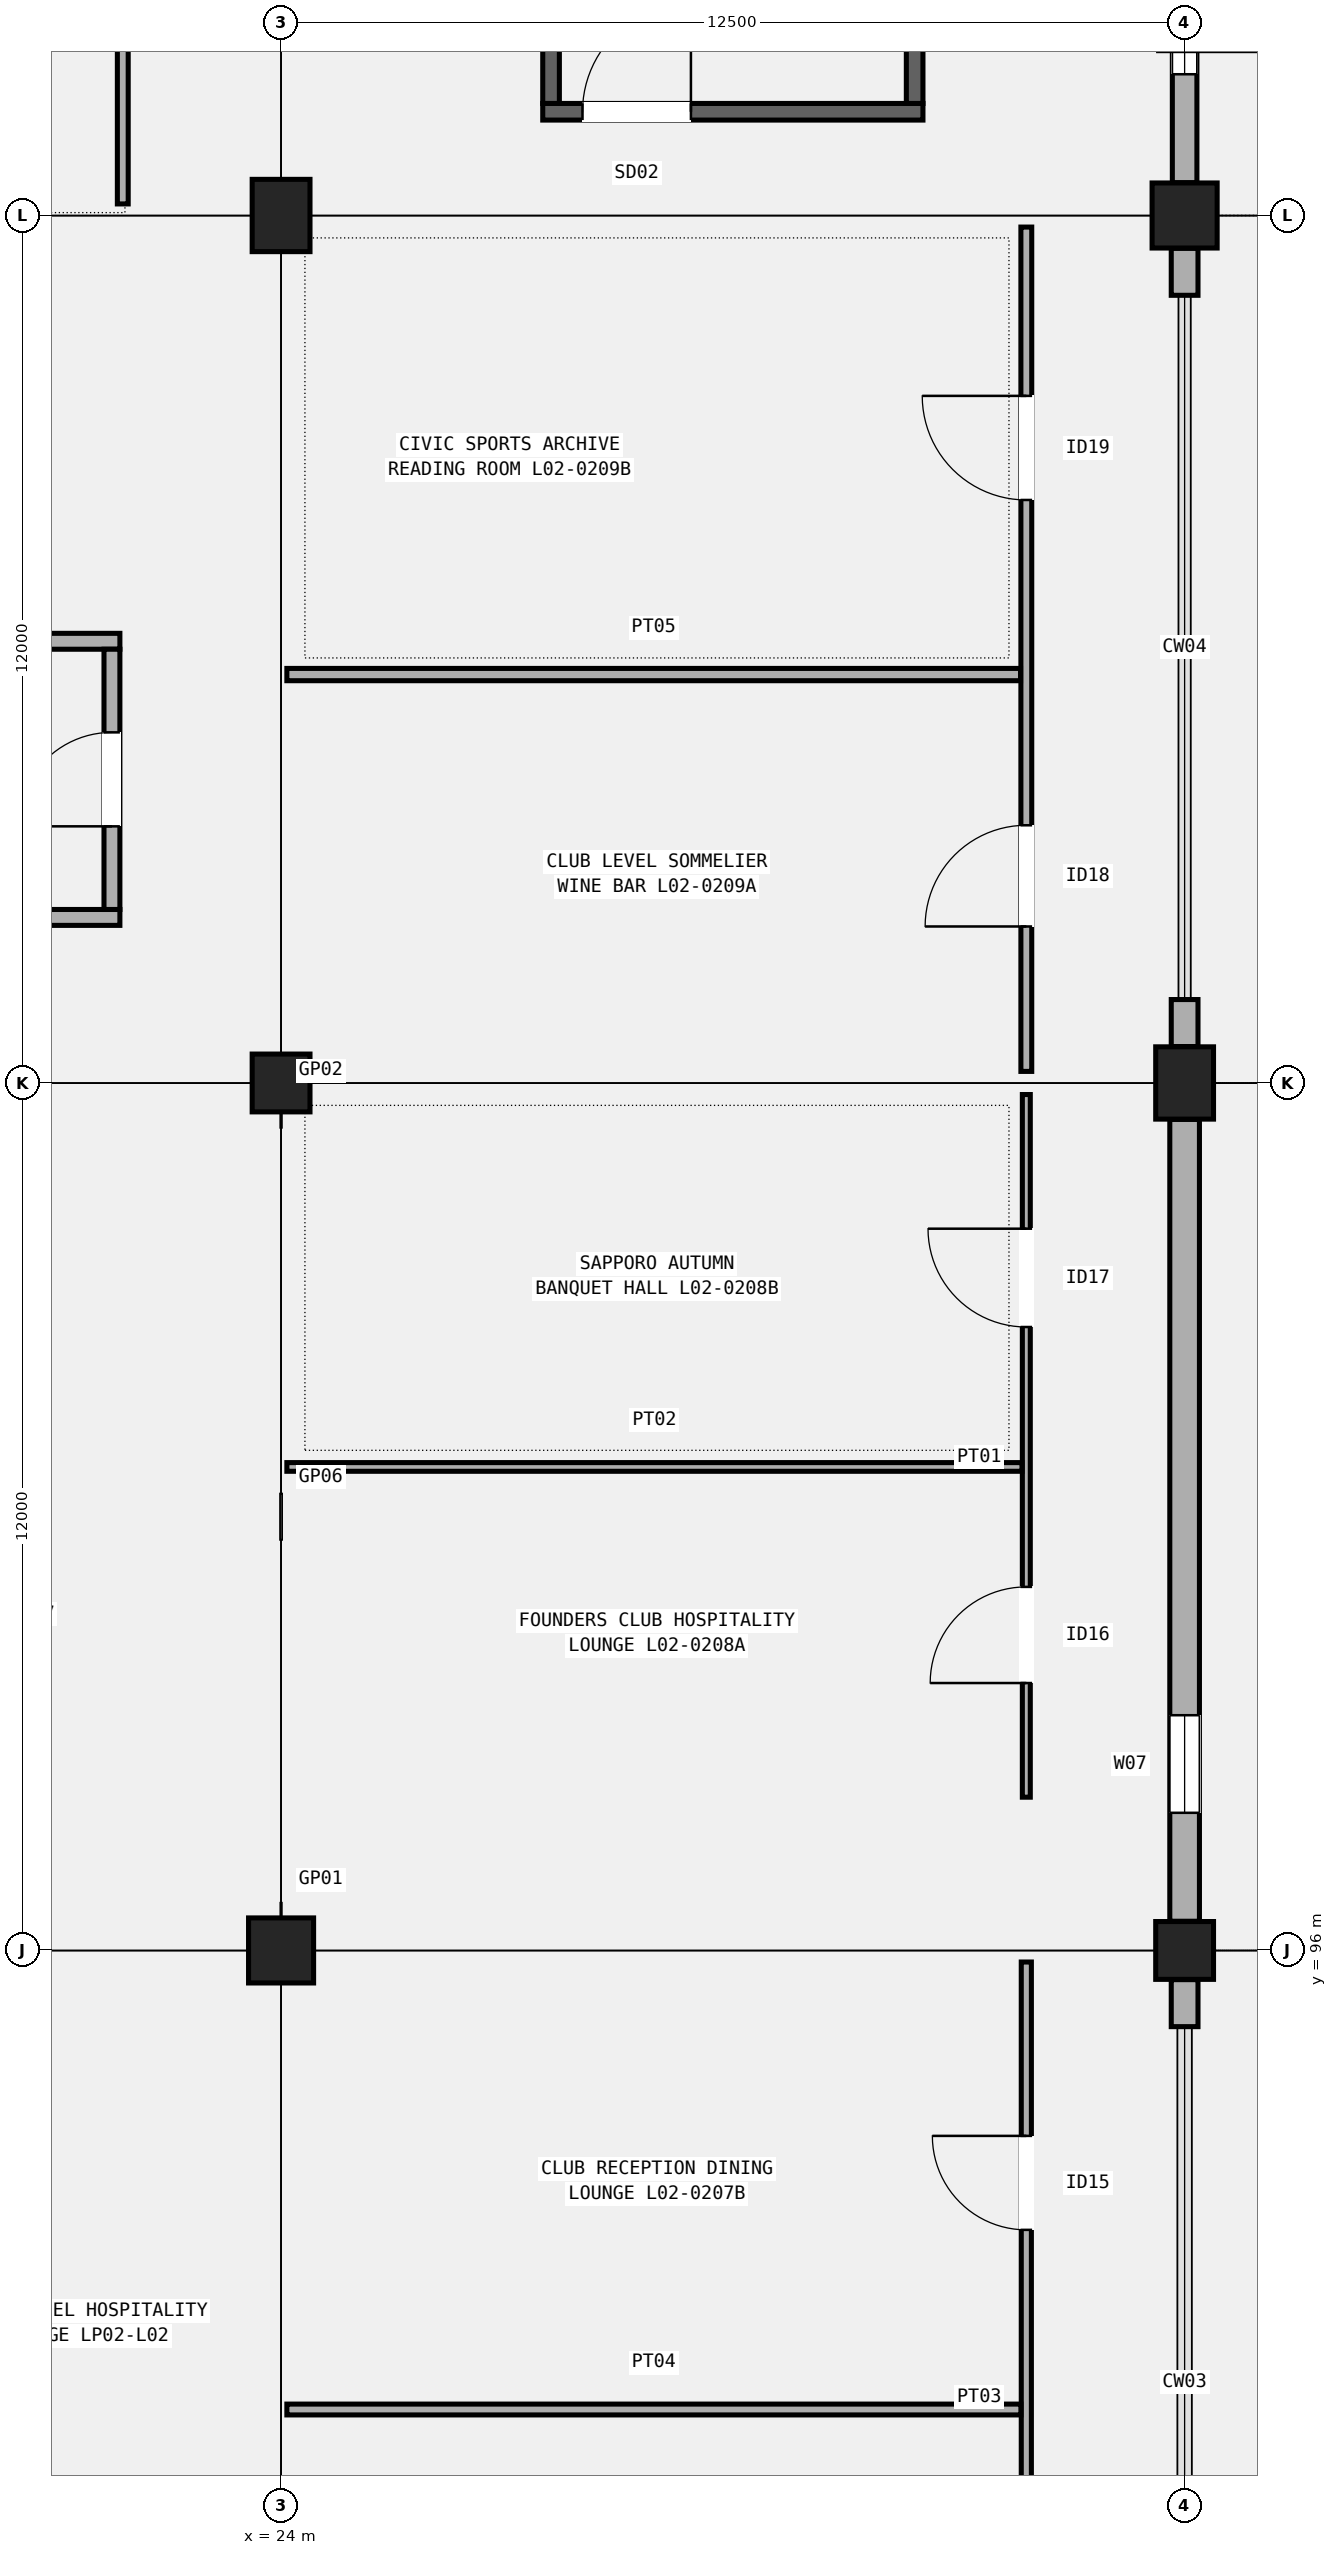
"""IFC4 building model, lengths in metres.
Left out: names, types, materials, properties, quantities, classifications, styles, units other than length and angle.
Written with IfcOpenShell. Run it as: python <this file> out.ifc"""

import sys

from ifc_helpers import new_model, si_unit, direction, frame, frame_2d, origin, origin_2d, place, context, subcontext, project, spatial, rectangle, extrude, element, fill, save


model = new_model("IFC4")
c1 = context("Model", 3, precision=1e-05, world=origin(), true_north=direction((0.0, 1.0)))
c2 = subcontext(c1, "Body", "Model", "MODEL_VIEW")
j1 = project(units=[si_unit("LENGTHUNIT", "METRE"), si_unit("PLANEANGLEUNIT", "RADIAN")], contexts=[c1])
p1 = place(None, origin())
s1 = spatial("IfcSite", under=j1, at=p1, CompositionType="ELEMENT")
p2 = place(p1, origin())
s2 = spatial("IfcBuilding", under=s1, at=p2, CompositionType="ELEMENT")
p3 = place(p2, frame((0.0, 0.0, 10.2)))
s3 = spatial("IfcBuildingStorey", under=s2, at=p3, CompositionType="ELEMENT", Elevation=10.2)
p4 = place(p3, frame((24.0, 96.0, 0.0), z_axis=(0.0, 0.0, 1.0), x_axis=(1.0, 0.0, 0.0)))
e1 = element("IfcColumn", 1, at=p4, inside=s3, PredefinedType="COLUMN", context=c2, shape_type="SweptSolid", body=[
    extrude(rectangle(XDim=0.9, YDim=0.9, at=origin_2d()), origin(), (0.0, 0.0, 1.0), 5.1),
])
p5 = place(p3, frame((24.0, 108.0, 0.0), z_axis=(0.0, 0.0, 1.0), x_axis=(1.0, 0.0, 0.0)))
e2 = element("IfcColumn", 2, at=p5, inside=s3, PredefinedType="COLUMN", context=c2, shape_type="SweptSolid", body=[
    extrude(rectangle(XDim=0.8, YDim=0.8, at=origin_2d()), origin(), (0.0, 0.0, 1.0), 5.1),
])
p6 = place(p3, frame((24.0, 120.0, 0.0), z_axis=(0.0, 0.0, 1.0), x_axis=(1.0, 0.0, 0.0)))
e3 = element("IfcColumn", 3, at=p6, inside=s3, PredefinedType="COLUMN", context=c2, shape_type="SweptSolid", body=[
    extrude(rectangle(XDim=0.8, YDim=1.0, at=origin_2d()), origin(), (0.0, 0.0, 1.0), 5.1),
])
p7 = place(p3, frame((36.5, 96.0, 0.0), z_axis=(0.0, 0.0, 1.0), x_axis=(1.0, 0.0, 0.0)))
e4 = element("IfcColumn", 4, at=p7, inside=s3, PredefinedType="COLUMN", context=c2, shape_type="SweptSolid", body=[
    extrude(rectangle(XDim=0.8, YDim=0.8, at=origin_2d()), origin(), (0.0, 0.0, 1.0), 5.1),
])
p8 = place(p3, frame((36.5, 108.0, 0.0), z_axis=(0.0, 0.0, 1.0), x_axis=(1.0, 0.0, 0.0)))
e5 = element("IfcColumn", 5, at=p8, inside=s3, PredefinedType="COLUMN", context=c2, shape_type="SweptSolid", body=[
    extrude(rectangle(XDim=0.8, YDim=1.0, at=origin_2d()), origin(), (0.0, 0.0, 1.0), 5.1),
])
p9 = place(p3, frame((36.5, 120.0, 0.0), z_axis=(0.0, 0.0, 1.0), x_axis=(1.0, 0.0, 0.0)))
e6 = element("IfcColumn", 6, at=p9, inside=s3, PredefinedType="COLUMN", context=c2, shape_type="SweptSolid", body=[
    extrude(rectangle(XDim=0.9, YDim=0.9, at=origin_2d()), origin(), (0.0, 0.0, 1.0), 5.1),
])
p10 = place(p3, frame((36.5, 94.946, 0.0), z_axis=(0.0, 0.0, 1.0), x_axis=(0.0, 1.0, 0.0)))
e7 = element("IfcWall", 7, at=p10, inside=s3, PredefinedType="SOLIDWALL", context=c2, shape_type="SweptSolid", body=[
    extrude(rectangle(XDim=0.65, YDim=0.37, at=frame_2d((0.325, 0.0))), origin(), (0.0, 0.0, 1.0), 4.12),
])
p11 = place(p3, frame((36.5, 96.404, 0.0), z_axis=(0.0, 0.0, 1.0), x_axis=(0.0, 1.0, 0.0)))
e8 = element("IfcWall", 8, at=p11, inside=s3, PredefinedType="SOLIDWALL", context=c2, shape_type="SweptSolid", body=[
    extrude(rectangle(XDim=11.092, YDim=0.41, at=frame_2d((5.546, 0.0))), origin(), (0.0, 0.0, 1.0), 4.232),
])
p12 = place(p11, frame((1.5, 0.0, 0.95)))
e9 = element("IfcOpeningElement", 9, at=p12, cuts=e8, PredefinedType="OPENING", context=c2, shape_type="SweptSolid", body=[
    extrude(rectangle(XDim=1.35, YDim=2.0, at=frame_2d((0.675, 1.0))), frame((0.0, 0.215, 0.0), z_axis=(0.0, -1.0, 0.0), x_axis=(1.0, 0.0, 0.0)), (0.0, 0.0, 1.0), 0.43),
])
p13 = place(p3, frame((36.5, 108.504, 0.0), z_axis=(0.0, 0.0, 1.0), x_axis=(0.0, 1.0, 0.0)))
e10 = element("IfcWall", 10, at=p13, inside=s3, PredefinedType="SOLIDWALL", context=c2, shape_type="SweptSolid", body=[
    extrude(rectangle(XDim=0.65, YDim=0.37, at=frame_2d((0.325, 0.0))), origin(), (0.0, 0.0, 1.0), 4.02),
])
p14 = place(p3, frame((36.5, 118.896, 0.0), z_axis=(0.0, 0.0, 1.0), x_axis=(0.0, 1.0, 0.0)))
e11 = element("IfcWall", 11, at=p14, inside=s3, PredefinedType="SOLIDWALL", context=c2, shape_type="SweptSolid", body=[
    extrude(rectangle(XDim=0.65, YDim=0.37, at=frame_2d((0.325, 0.0))), origin(), (0.0, 0.0, 1.0), 4.02),
])
p15 = place(p3, frame((36.5, 120.454, 0.0), z_axis=(0.0, 0.0, 1.0), x_axis=(0.0, 1.0, 0.0)))
e12 = element("IfcWall", 12, at=p15, inside=s3, PredefinedType="SOLIDWALL", context=c2, shape_type="SweptSolid", body=[
    extrude(rectangle(XDim=11.142, YDim=0.34, at=frame_2d((5.571, 0.0))), origin(), (0.0, 0.0, 1.0), 4.12),
])
p16 = place(p15, frame((1.5, 0.0, 0.95)))
e13 = element("IfcOpeningElement", 13, at=p16, cuts=e12, PredefinedType="OPENING", context=c2, shape_type="SweptSolid", body=[
    extrude(rectangle(XDim=1.35, YDim=2.4, at=frame_2d((0.675, 1.2))), frame((0.0, 0.18, 0.0), z_axis=(0.0, -1.0, 0.0), x_axis=(1.0, 0.0, 0.0)), (0.0, 0.0, 1.0), 0.36),
])
p17 = place(p3, frame((27.62, 121.435, 0.0), z_axis=(0.0, 0.0, 1.0), x_axis=(1.0, 0.0, 0.0)))
e14 = element("IfcWall", 14, at=p17, inside=s3, PredefinedType="SHEAR", context=c2, shape_type="SweptSolid", body=[
    extrude(rectangle(XDim=5.26, YDim=0.23, at=frame_2d((2.63, 0.0))), origin(), (0.0, 0.0, 1.0), 4.82),
])
p18 = place(p17, frame((0.55, 0.0, 0.0)))
e15 = element("IfcOpeningElement", 15, at=p18, cuts=e14, PredefinedType="OPENING", context=c2, shape_type="SweptSolid", body=[
    extrude(rectangle(XDim=1.5, YDim=2.2, at=frame_2d((0.75, 1.1))), frame((0.0, 0.125, 0.0), z_axis=(0.0, -1.0, 0.0), x_axis=(1.0, 0.0, 0.0)), (0.0, 0.0, 1.0), 0.25),
])
for number, where, z_axis, x_axis in (
    (16, (27.735, 121.55, 0.0), (0.0, 0.0, 1.0), (0.0, 1.0, 0.0)),
    (17, (32.765, 121.55, 0.0), (0.0, 0.0, 1.0), (0.0, 1.0, 0.0)),
):
    element("IfcWall", number, at=place(p3, frame(where, z_axis=z_axis, x_axis=x_axis)), inside=s3, PredefinedType="SHEAR", context=c2, shape_type="SweptSolid", body=[
        extrude(rectangle(XDim=8.9, YDim=0.23, at=frame_2d((4.45, 0.0))), origin(), (0.0, 0.0, 1.0), 4.82),
    ])
for number, where, z_axis, x_axis in (
    (18, (17.48, 110.29, 0.0), (0.0, 0.0, 1.0), (1.0, 0.0, 0.0)),
    (19, (17.48, 114.11, 0.0), (0.0, 0.0, 1.0), (1.0, 0.0, 0.0)),
):
    element("IfcWall", number, at=place(p3, frame(where, z_axis=z_axis, x_axis=x_axis)), inside=s3, PredefinedType="SOLIDWALL", context=c2, shape_type="SweptSolid", body=[
        extrude(rectangle(XDim=4.29, YDim=0.22, at=frame_2d((2.145, 0.0))), origin(), (0.0, 0.0, 1.0), 4.22),
    ])
p19 = place(p3, frame((21.66, 110.4, 0.0), z_axis=(0.0, 0.0, 1.0), x_axis=(0.0, 1.0, 0.0)))
e20 = element("IfcWall", 20, at=p19, inside=s3, PredefinedType="SOLIDWALL", context=c2, shape_type="SweptSolid", body=[
    extrude(rectangle(XDim=3.6, YDim=0.22, at=frame_2d((1.8, 0.0))), origin(), (0.0, 0.0, 1.0), 4.22),
])
p20 = place(p19, frame((1.15, 0.0, 0.0)))
e21 = element("IfcOpeningElement", 21, at=p20, cuts=e20, PredefinedType="OPENING", context=c2, shape_type="SweptSolid", body=[
    extrude(rectangle(XDim=1.3, YDim=2.15, at=frame_2d((0.65, 1.075))), frame((0.0, 0.12, 0.0), z_axis=(0.0, -1.0, 0.0), x_axis=(1.0, 0.0, 0.0)), (0.0, 0.0, 1.0), 0.24),
])
p21 = place(p3, frame((21.81, 120.16, 0.0), z_axis=(0.0, 0.0, 1.0), x_axis=(0.0, 1.0, 0.0)))
e22 = element("IfcWall", 22, at=p21, inside=s3, PredefinedType="PARTITIONING", context=c2, shape_type="SweptSolid", body=[
    extrude(rectangle(XDim=11.68, YDim=0.15, at=frame_2d((5.84, 0.0))), origin(), (0.0, 0.0, 1.0), 4.22),
])
p22 = place(p21, frame((5.35, 0.0, 0.0)))
e23 = element("IfcOpeningElement", 23, at=p22, cuts=e22, PredefinedType="OPENING", context=c2, shape_type="SweptSolid", body=[
    extrude(rectangle(XDim=0.98, YDim=2.1, at=frame_2d((0.49, 1.05))), frame((0.0, 0.085, 0.0), z_axis=(0.0, -1.0, 0.0), x_axis=(1.0, 0.0, 0.0)), (0.0, 0.0, 1.0), 0.17),
])
p23 = place(p3, frame((34.31, 84.16, 0.0), z_axis=(0.0, 0.0, 1.0), x_axis=(0.0, 1.0, 0.0)))
e24 = element("IfcWall", 24, at=p23, inside=s3, PredefinedType="PARTITIONING", context=c2, shape_type="SweptSolid", body=[
    extrude(rectangle(XDim=11.68, YDim=0.14, at=frame_2d((5.84, 0.0))), origin(), (0.0, 0.0, 1.0), 4.22),
])
p24 = place(p23, frame((2.07, 0.0, 0.0)))
e25 = element("IfcOpeningElement", 25, at=p24, cuts=e24, PredefinedType="OPENING", context=c2, shape_type="SweptSolid", body=[
    extrude(rectangle(XDim=1.27, YDim=2.2, at=frame_2d((0.635, 1.1))), frame((0.0, 0.08, 0.0), z_axis=(0.0, -1.0, 0.0), x_axis=(1.0, 0.0, 0.0)), (0.0, 0.0, 1.0), 0.16),
])
p25 = place(p23, frame((7.975, 0.0, 0.0)))
e26 = element("IfcOpeningElement", 26, at=p25, cuts=e24, PredefinedType="OPENING", context=c2, shape_type="SweptSolid", body=[
    extrude(rectangle(XDim=1.3, YDim=2.24, at=frame_2d((0.65, 1.12))), frame((0.0, 0.08, 0.0), z_axis=(0.0, -1.0, 0.0), x_axis=(1.0, 0.0, 0.0)), (0.0, 0.0, 1.0), 0.16),
])
p26 = place(p3, frame((24.08, 89.65, 0.0), z_axis=(0.0, 0.0, 1.0), x_axis=(1.0, 0.0, 0.0)))
e27 = element("IfcWall", 27, at=p26, inside=s3, PredefinedType="PARTITIONING", context=c2, shape_type="SweptSolid", body=[
    extrude(rectangle(XDim=10.155, YDim=0.15, at=frame_2d((5.078, 0.0))), origin(), (0.0, 0.0, 1.0), 4.22),
])
p27 = place(p3, frame((34.31, 98.12, 0.0), z_axis=(0.0, 0.0, 1.0), x_axis=(0.0, 1.0, 0.0)))
e28 = element("IfcWall", 28, at=p27, inside=s3, PredefinedType="PARTITIONING", context=c2, shape_type="SweptSolid", body=[
    extrude(rectangle(XDim=9.72, YDim=0.11, at=frame_2d((4.86, 0.0))), origin(), (0.0, 0.0, 1.0), 4.22),
])
p28 = place(p27, frame((1.579, 0.0, 0.0)))
e29 = element("IfcOpeningElement", 29, at=p28, cuts=e28, PredefinedType="OPENING", context=c2, shape_type="SweptSolid", body=[
    extrude(rectangle(XDim=1.33, YDim=2.22, at=frame_2d((0.665, 1.11))), frame((0.0, 0.065, 0.0), z_axis=(0.0, -1.0, 0.0), x_axis=(1.0, 0.0, 0.0)), (0.0, 0.0, 1.0), 0.13),
])
p29 = place(p27, frame((6.504, 0.0, 0.0)))
e30 = element("IfcOpeningElement", 30, at=p29, cuts=e28, PredefinedType="OPENING", context=c2, shape_type="SweptSolid", body=[
    extrude(rectangle(XDim=1.36, YDim=2.25, at=frame_2d((0.68, 1.125))), frame((0.0, 0.065, 0.0), z_axis=(0.0, -1.0, 0.0), x_axis=(1.0, 0.0, 0.0)), (0.0, 0.0, 1.0), 0.13),
])
p30 = place(p3, frame((24.08, 102.688, 0.0), z_axis=(0.0, 0.0, 1.0), x_axis=(1.0, 0.0, 0.0)))
e31 = element("IfcWall", 31, at=p30, inside=s3, PredefinedType="PARTITIONING", context=c2, shape_type="SweptSolid", body=[
    extrude(rectangle(XDim=10.17, YDim=0.12, at=frame_2d((5.085, 0.0))), origin(), (0.0, 0.0, 1.0), 4.22),
])
p31 = place(p3, frame((34.31, 108.16, 0.0), z_axis=(0.0, 0.0, 1.0), x_axis=(0.0, 1.0, 0.0)))
e32 = element("IfcWall", 32, at=p31, inside=s3, PredefinedType="PARTITIONING", context=c2, shape_type="SweptSolid", body=[
    extrude(rectangle(XDim=11.68, YDim=0.15, at=frame_2d((5.84, 0.0))), origin(), (0.0, 0.0, 1.0), 4.22),
])
p32 = place(p31, frame((2.005, 0.0, 0.0)))
e33 = element("IfcOpeningElement", 33, at=p32, cuts=e32, PredefinedType="OPENING", context=c2, shape_type="SweptSolid", body=[
    extrude(rectangle(XDim=1.4, YDim=2.24, at=frame_2d((0.7, 1.12))), frame((0.0, 0.085, 0.0), z_axis=(0.0, -1.0, 0.0), x_axis=(1.0, 0.0, 0.0)), (0.0, 0.0, 1.0), 0.17),
])
p33 = place(p31, frame((7.905, 0.0, 0.0)))
e34 = element("IfcOpeningElement", 34, at=p33, cuts=e32, PredefinedType="OPENING", context=c2, shape_type="SweptSolid", body=[
    extrude(rectangle(XDim=1.44, YDim=2.26, at=frame_2d((0.72, 1.13))), frame((0.0, 0.085, 0.0), z_axis=(0.0, -1.0, 0.0), x_axis=(1.0, 0.0, 0.0)), (0.0, 0.0, 1.0), 0.17),
])
p34 = place(p3, frame((24.08, 113.65, 0.0), z_axis=(0.0, 0.0, 1.0), x_axis=(1.0, 0.0, 0.0)))
e35 = element("IfcWall", 35, at=p34, inside=s3, PredefinedType="PARTITIONING", context=c2, shape_type="SweptSolid", body=[
    extrude(rectangle(XDim=10.15, YDim=0.17, at=frame_2d((5.075, 0.0))), origin(), (0.0, 0.0, 1.0), 4.22),
])
p35 = place(p12, origin())
e36 = element("IfcWindow", 36, at=p35, inside=s3, PartitioningType="SINGLE_PANEL", PredefinedType="WINDOW", context=c2, shape_type="SweptSolid", body=[
    extrude(rectangle(XDim=1.35, YDim=2.0, at=frame_2d((0.675, 1.0))), frame((0.0, 0.03, 0.0), z_axis=(0.0, -1.0, 0.0), x_axis=(1.0, 0.0, 0.0)), (0.0, 0.0, 1.0), 0.06),
])
fill(e9, e36)
p36 = place(p16, origin())
e37 = element("IfcWindow", 37, at=p36, inside=s3, PartitioningType="SINGLE_PANEL", PredefinedType="WINDOW", context=c2, shape_type="SweptSolid", body=[
    extrude(rectangle(XDim=1.35, YDim=2.4, at=frame_2d((0.675, 1.2))), frame((0.0, 0.03, 0.0), z_axis=(0.0, -1.0, 0.0), x_axis=(1.0, 0.0, 0.0)), (0.0, 0.0, 1.0), 0.06),
])
fill(e13, e37)
p37 = place(p18, origin())
e38 = element("IfcDoor", 38, at=p37, inside=s3, OperationType="SINGLE_SWING_RIGHT", PredefinedType="DOOR", context=c2, shape_type="SweptSolid", body=[
    extrude(rectangle(XDim=1.5, YDim=2.2, at=frame_2d((0.75, 1.1))), frame((0.0, 0.025, 0.0), z_axis=(0.0, -1.0, 0.0), x_axis=(1.0, 0.0, 0.0)), (0.0, 0.0, 1.0), 0.05),
])
fill(e15, e38)
p38 = place(p20, origin())
e39 = element("IfcDoor", 39, at=p38, inside=s3, OperationType="SINGLE_SWING_LEFT", PredefinedType="DOOR", context=c2, shape_type="SweptSolid", body=[
    extrude(rectangle(XDim=1.3, YDim=2.15, at=frame_2d((0.65, 1.075))), frame((0.0, 0.025, 0.0), z_axis=(0.0, -1.0, 0.0), x_axis=(1.0, 0.0, 0.0)), (0.0, 0.0, 1.0), 0.05),
])
fill(e21, e39)
p39 = place(p25, origin())
e40 = element("IfcDoor", 40, at=p39, inside=s3, OperationType="SINGLE_SWING_RIGHT", PredefinedType="DOOR", context=c2, shape_type="SweptSolid", body=[
    extrude(rectangle(XDim=1.3, YDim=2.24, at=frame_2d((0.65, 1.12))), frame((0.0, 0.025, 0.0), z_axis=(0.0, -1.0, 0.0), x_axis=(1.0, 0.0, 0.0)), (0.0, 0.0, 1.0), 0.05),
])
fill(e26, e40)
p40 = place(p28, origin())
e41 = element("IfcDoor", 41, at=p40, inside=s3, OperationType="SINGLE_SWING_LEFT", PredefinedType="DOOR", context=c2, shape_type="SweptSolid", body=[
    extrude(rectangle(XDim=1.33, YDim=2.22, at=frame_2d((0.665, 1.11))), frame((0.0, 0.025, 0.0), z_axis=(0.0, -1.0, 0.0), x_axis=(1.0, 0.0, 0.0)), (0.0, 0.0, 1.0), 0.05),
])
fill(e29, e41)
p41 = place(p29, origin())
e42 = element("IfcDoor", 42, at=p41, inside=s3, OperationType="SINGLE_SWING_RIGHT", PredefinedType="DOOR", context=c2, shape_type="SweptSolid", body=[
    extrude(rectangle(XDim=1.36, YDim=2.25, at=frame_2d((0.68, 1.125))), frame((0.0, 0.025, 0.0), z_axis=(0.0, -1.0, 0.0), x_axis=(1.0, 0.0, 0.0)), (0.0, 0.0, 1.0), 0.05),
])
fill(e30, e42)
p42 = place(p32, origin())
e43 = element("IfcDoor", 43, at=p42, inside=s3, OperationType="SINGLE_SWING_LEFT", PredefinedType="DOOR", context=c2, shape_type="SweptSolid", body=[
    extrude(rectangle(XDim=1.4, YDim=2.24, at=frame_2d((0.7, 1.12))), frame((0.0, 0.025, 0.0), z_axis=(0.0, -1.0, 0.0), x_axis=(1.0, 0.0, 0.0)), (0.0, 0.0, 1.0), 0.05),
])
fill(e33, e43)
p43 = place(p33, origin())
e44 = element("IfcDoor", 44, at=p43, inside=s3, OperationType="SINGLE_SWING_RIGHT", PredefinedType="DOOR", context=c2, shape_type="SweptSolid", body=[
    extrude(rectangle(XDim=1.44, YDim=2.26, at=frame_2d((0.72, 1.13))), frame((0.0, 0.025, 0.0), z_axis=(0.0, -1.0, 0.0), x_axis=(1.0, 0.0, 0.0)), (0.0, 0.0, 1.0), 0.05),
])
fill(e34, e44)
save(model, sys.argv[1])
